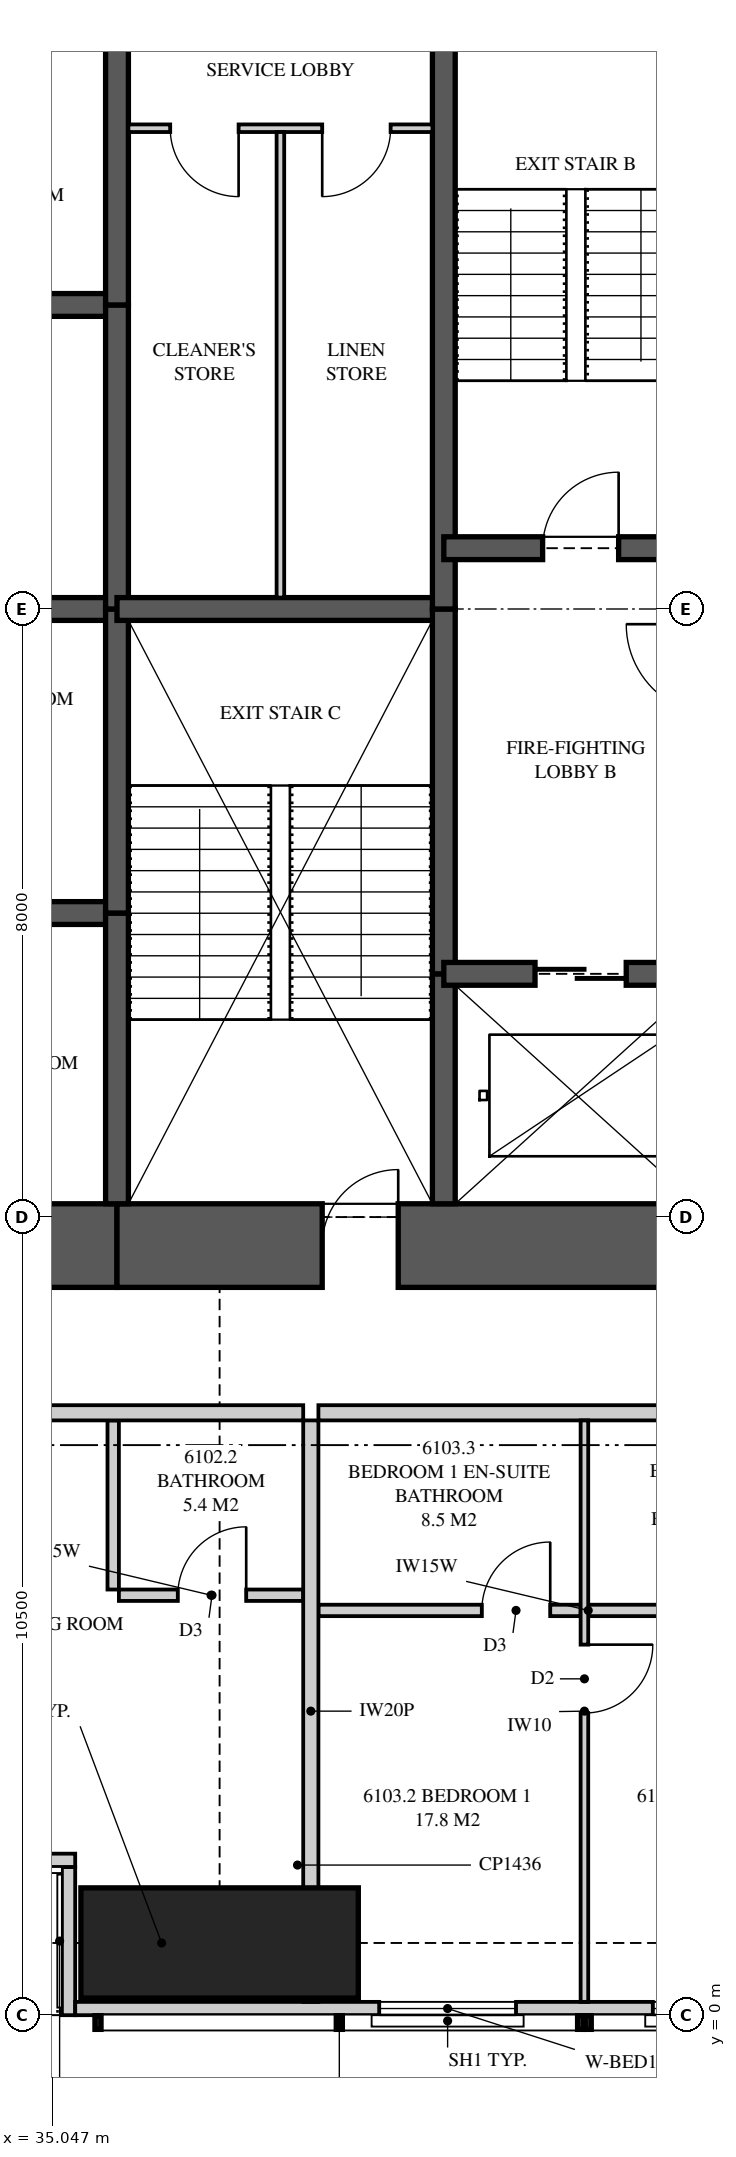
"""IFC4 building model, lengths in metres.
Left out: names, types, materials, properties, quantities, classifications, styles, units other than length and angle.
Written with IfcOpenShell. Run it as: python <this file> out.ifc"""

import sys

from ifc_helpers import new_model, si_unit, direction, frame, frame_2d, origin, origin_2d, place, context, subcontext, project, spatial, polyline, rectangle, outline, extrude, element, fill, save


model = new_model("IFC4")
c1 = context("Model", 3, precision=1e-05, world=origin(), true_north=direction((0.0, 1.0)))
c2 = subcontext(c1, "Body", "Model", "MODEL_VIEW")
j1 = project(units=[si_unit("LENGTHUNIT", "METRE"), si_unit("PLANEANGLEUNIT", "RADIAN")], contexts=[c1])
p1 = place(None, origin())
s1 = spatial("IfcSite", under=j1, at=p1, CompositionType="ELEMENT")
p2 = place(p1, origin())
s2 = spatial("IfcBuilding", under=s1, at=p2, CompositionType="ELEMENT")
p3 = place(p2, frame((0.0, 0.0, 224.95)))
s3 = spatial("IfcBuildingStorey", under=s2, at=p3, CompositionType="ELEMENT", Elevation=224.95)
p4 = place(p3, frame((37.25, 0.95, 0.0), z_axis=(0.0, 0.0, 1.0), x_axis=(0.0, 1.0, 0.0)))
e1 = element("IfcColumn", 1, at=p4, inside=s3, PredefinedType="COLUMN", context=c2, shape_type="SweptSolid", body=[
    extrude(rectangle(XDim=1.45, YDim=3.65, at=origin_2d()), origin(), (0.0, 0.0, 1.0), 3.5),
])
p5 = place(p3, frame((31.6, 10.125, 0.0), z_axis=(0.0, 0.0, 1.0), x_axis=(1.0, 0.0, 0.0)))
e2 = element("IfcWall", 2, at=p5, inside=s3, PredefinedType="SHEAR", context=c2, shape_type="SweptSolid", body=[
    extrude(rectangle(XDim=4.3, YDim=1.1, at=frame_2d((2.15, 0.0))), origin(), (0.0, 0.0, 1.0), 3.5),
])
p6 = place(p3, frame((35.9, 10.125, 0.0), z_axis=(0.0, 0.0, 1.0), x_axis=(1.0, 0.0, 0.0)))
e3 = element("IfcWall", 3, at=p6, inside=s3, PredefinedType="SHEAR", context=c2, shape_type="SweptSolid", body=[
    extrude(rectangle(XDim=8.175, YDim=1.1, at=frame_2d((4.087, 0.0))), origin(), (0.0, 0.0, 1.0), 3.5),
])
p7 = place(p6, frame((2.7, 0.0, 0.0)))
e4 = element("IfcOpeningElement", 4, at=p7, cuts=e3, PredefinedType="OPENING", context=c2, shape_type="SweptSolid", body=[
    extrude(rectangle(XDim=1.0, YDim=2.1, at=frame_2d((0.5, 1.05))), frame((0.0, 0.56, 0.0), z_axis=(0.0, -1.0, 0.0), x_axis=(1.0, 0.0, 0.0)), (0.0, 0.0, 1.0), 1.12),
])
p8 = place(p3, frame((35.9, 10.675, 0.0), z_axis=(0.0, 0.0, 1.0), x_axis=(0.0, 1.0, 0.0)))
e5 = element("IfcWall", 5, at=p8, inside=s3, PredefinedType="SHEAR", context=c2, shape_type="SweptSolid", body=[
    extrude(rectangle(XDim=3.825, YDim=0.3, at=frame_2d((1.913, 0.0))), origin(), (0.0, 0.0, 1.0), 3.5),
])
for number, where, z_axis, x_axis in (
    (6, (35.9, 14.5, 0.0), (0.0, 0.0, 1.0), (0.0, 1.0, 0.0)),
    (7, (35.9, 18.5, 0.0), (0.0, 0.0, 1.0), (0.0, 1.0, 0.0)),
):
    element("IfcWall", number, at=place(p3, frame(where, z_axis=z_axis, x_axis=x_axis)), inside=s3, PredefinedType="SHEAR", context=c2, shape_type="SweptSolid", body=[
        extrude(rectangle(XDim=4.0, YDim=0.3, at=frame_2d((2.0, 0.0))), origin(), (0.0, 0.0, 1.0), 3.5),
    ])
p9 = place(p3, frame((35.9, 22.5, 0.0), z_axis=(0.0, 0.0, 1.0), x_axis=(0.0, 1.0, 0.0)))
e8 = element("IfcWall", 8, at=p9, inside=s3, PredefinedType="SHEAR", context=c2, shape_type="SweptSolid", body=[
    extrude(rectangle(XDim=3.825, YDim=0.3, at=frame_2d((1.913, 0.0))), origin(), (0.0, 0.0, 1.0), 3.5),
])
p10 = place(p3, frame((40.2, 10.675, 0.0), z_axis=(0.0, 0.0, 1.0), x_axis=(0.0, 1.0, 0.0)))
e9 = element("IfcWall", 9, at=p10, inside=s3, PredefinedType="SHEAR", context=c2, shape_type="SweptSolid", body=[
    extrude(rectangle(XDim=3.025, YDim=0.3, at=frame_2d((1.512, 0.0))), origin(), (0.0, 0.0, 1.0), 3.5),
])
p11 = place(p3, frame((40.2, 13.7, 0.0), z_axis=(0.0, 0.0, 1.0), x_axis=(0.0, 1.0, 0.0)))
e10 = element("IfcWall", 10, at=p11, inside=s3, PredefinedType="SHEAR", context=c2, shape_type="SweptSolid", body=[
    extrude(rectangle(XDim=4.8, YDim=0.3, at=frame_2d((2.4, 0.0))), origin(), (0.0, 0.0, 1.0), 3.5),
])
p12 = place(p3, frame((40.2, 18.5, 0.0), z_axis=(0.0, 0.0, 1.0), x_axis=(0.0, 1.0, 0.0)))
e11 = element("IfcWall", 11, at=p12, inside=s3, PredefinedType="SHEAR", context=c2, shape_type="SweptSolid", body=[
    extrude(rectangle(XDim=7.825, YDim=0.3, at=frame_2d((3.913, 0.0))), origin(), (0.0, 0.0, 1.0), 3.5),
])
for number, where, z_axis, x_axis in (
    (12, (31.6, 14.5, 0.0), (0.0, 0.0, 1.0), (1.0, 0.0, 0.0)),
    (13, (31.6, 18.5, 0.0), (0.0, 0.0, 1.0), (1.0, 0.0, 0.0)),
    (14, (31.6, 22.5, 0.0), (0.0, 0.0, 1.0), (1.0, 0.0, 0.0)),
):
    element("IfcWall", number, at=place(p3, frame(where, z_axis=z_axis, x_axis=x_axis)), inside=s3, PredefinedType="SHEAR", context=c2, shape_type="SweptSolid", body=[
        extrude(rectangle(XDim=4.3, YDim=0.3, at=frame_2d((2.15, 0.0))), origin(), (0.0, 0.0, 1.0), 3.5),
    ])
p13 = place(p3, frame((35.9, 18.5, 0.0), z_axis=(0.0, 0.0, 1.0), x_axis=(1.0, 0.0, 0.0)))
e15 = element("IfcWall", 15, at=p13, inside=s3, PredefinedType="SHEAR", context=c2, shape_type="SweptSolid", body=[
    extrude(rectangle(XDim=4.3, YDim=0.3, at=frame_2d((2.15, 0.0))), origin(), (0.0, 0.0, 1.0), 3.5),
])
p14 = place(p3, frame((40.2, 13.7, 0.0), z_axis=(0.0, 0.0, 1.0), x_axis=(1.0, 0.0, 0.0)))
e16 = element("IfcWall", 16, at=p14, inside=s3, PredefinedType="SHEAR", context=c2, shape_type="SweptSolid", body=[
    extrude(rectangle(XDim=3.6, YDim=0.3, at=frame_2d((1.8, 0.0))), origin(), (0.0, 0.0, 1.0), 3.5),
])
p15 = place(p14, frame((1.2, 0.0, 0.0)))
e17 = element("IfcOpeningElement", 17, at=p15, cuts=e16, PredefinedType="OPENING", context=c2, shape_type="SweptSolid", body=[
    extrude(rectangle(XDim=1.2, YDim=2.1, at=frame_2d((0.6, 1.05))), frame((0.0, 0.16, 0.0), z_axis=(0.0, -1.0, 0.0), x_axis=(1.0, 0.0, 0.0)), (0.0, 0.0, 1.0), 0.32),
])
p16 = place(p3, frame((40.2, 19.3, 0.0), z_axis=(0.0, 0.0, 1.0), x_axis=(1.0, 0.0, 0.0)))
e18 = element("IfcWall", 18, at=p16, inside=s3, PredefinedType="SHEAR", context=c2, shape_type="SweptSolid", body=[
    extrude(rectangle(XDim=3.6, YDim=0.3, at=frame_2d((1.8, 0.0))), origin(), (0.0, 0.0, 1.0), 3.5),
])
p17 = place(p16, frame((1.3, 0.0, 0.0)))
e19 = element("IfcOpeningElement", 19, at=p17, cuts=e18, PredefinedType="OPENING", context=c2, shape_type="SweptSolid", body=[
    extrude(rectangle(XDim=1.0, YDim=2.1, at=frame_2d((0.5, 1.05))), frame((0.0, 0.16, 0.0), z_axis=(0.0, -1.0, 0.0), x_axis=(1.0, 0.0, 0.0)), (0.0, 0.0, 1.0), 0.32),
])
p18 = place(p3, frame((35.35, 0.087, 0.0), z_axis=(0.0, 0.0, 1.0), x_axis=(1.0, 0.0, 0.0)))
e20 = element("IfcWall", 20, at=p18, inside=s3, PredefinedType="SOLIDWALL", context=c2, shape_type="SweptSolid", body=[
    extrude(outline(polyline([(0.0, 0.0), (18.099, 0.0), (18.099, 3.26), (11.74, 3.26), (11.74, 2.3), (11.656, 2.3), (11.656, 3.26), (11.525, 3.26), (11.525, 2.3), (0.0, 2.3), (0.0, 0.0)])), frame((0.0, 0.087, 0.0), z_axis=(0.0, -1.0, 0.0), x_axis=(1.0, 0.0, 0.0)), (0.0, 0.0, 1.0), 0.175),
])
p19 = place(p18, frame((4.0, 0.0, 0.4)))
e21 = element("IfcOpeningElement", 21, at=p19, cuts=e20, PredefinedType="OPENING", context=c2, shape_type="SweptSolid", body=[
    extrude(rectangle(XDim=1.8, YDim=1.85, at=frame_2d((0.9, 0.925))), frame((0.0, 0.097, 0.0), z_axis=(0.0, -1.0, 0.0), x_axis=(1.0, 0.0, 0.0)), (0.0, 0.0, 1.0), 0.195),
])
p20 = place(p18, frame((7.6, 0.0, 0.4)))
e22 = element("IfcOpeningElement", 22, at=p20, cuts=e20, PredefinedType="OPENING", context=c2, shape_type="SweptSolid", body=[
    extrude(rectangle(XDim=1.8, YDim=1.85, at=frame_2d((0.9, 0.925))), frame((0.0, 0.097, 0.0), z_axis=(0.0, -1.0, 0.0), x_axis=(1.0, 0.0, 0.0)), (0.0, 0.0, 1.0), 0.195),
])
p21 = place(p18, frame((13.51, 0.0, 0.4)))
e23 = element("IfcOpeningElement", 23, at=p21, cuts=e20, PredefinedType="OPENING", context=c2, shape_type="SweptSolid", body=[
    extrude(rectangle(XDim=2.4, YDim=1.85, at=frame_2d((1.2, 0.925))), frame((0.0, 0.097, 0.0), z_axis=(0.0, -1.0, 0.0), x_axis=(1.0, 0.0, 0.0)), (0.0, 0.0, 1.0), 0.195),
])
p22 = place(p3, frame((32.3, 2.038, 0.0), z_axis=(0.0, 0.0, 1.0), x_axis=(1.0, 0.0, 0.0)))
e24 = element("IfcWall", 24, at=p22, inside=s3, PredefinedType="SOLIDWALL", context=c2, shape_type="SweptSolid", body=[
    extrude(rectangle(XDim=3.05, YDim=0.175, at=frame_2d((1.525, 0.0))), origin(), (0.0, 0.0, 1.0), 3.26),
])
p23 = place(p22, frame((0.625, 0.0, 0.0)))
e25 = element("IfcOpeningElement", 25, at=p23, cuts=e24, PredefinedType="OPENING", context=c2, shape_type="SweptSolid", body=[
    extrude(rectangle(XDim=1.8, YDim=2.25, at=frame_2d((0.9, 1.125))), frame((0.0, 0.097, 0.0), z_axis=(0.0, -1.0, 0.0), x_axis=(1.0, 0.0, 0.0)), (0.0, 0.0, 1.0), 0.195),
])
p24 = place(p3, frame((35.262, 0.0, 0.0), z_axis=(0.0, 0.0, 1.0), x_axis=(0.0, 1.0, 0.0)))
e26 = element("IfcWall", 26, at=p24, inside=s3, PredefinedType="SOLIDWALL", context=c2, shape_type="SweptSolid", body=[
    extrude(outline(polyline([(0.0, 0.0), (1.95, 0.0), (1.95, 3.26), (1.75, 3.26), (1.75, 2.3), (0.15, 2.3), (0.15, 3.26), (0.0, 3.26), (0.0, 0.0)])), frame((0.0, 0.087, 0.0), z_axis=(0.0, -1.0, 0.0), x_axis=(1.0, 0.0, 0.0)), (0.0, 0.0, 1.0), 0.175),
])
p25 = place(p3, frame((38.45, 0.175, 0.0), z_axis=(0.0, 0.0, 1.0), x_axis=(0.0, 1.0, 0.0)))
e27 = element("IfcWall", 27, at=p25, inside=s3, PredefinedType="PARTITIONING", context=c2, shape_type="SweptSolid", body=[
    extrude(outline(polyline([(0.529, 2.3), (0.0, 2.3), (0.0, 0.0), (0.529, 0.0), (0.529, 0.338), (1.021, 0.338), (1.021, 0.0), (7.65, 0.0), (7.65, 2.66), (1.685, 2.66), (1.685, 2.3), (1.021, 2.3), (1.021, 1.962), (0.529, 1.962), (0.529, 2.3)])), frame((0.0, 0.1, 0.0), z_axis=(0.0, -1.0, 0.0), x_axis=(1.0, 0.0, 0.0)), (0.0, 0.0, 1.0), 0.2),
])
p26 = place(p3, frame((26.5, 7.925, 0.0), z_axis=(0.0, 0.0, 1.0), x_axis=(1.0, 0.0, 0.0)))
e28 = element("IfcWall", 28, at=p26, inside=s3, PredefinedType="PARTITIONING", context=c2, shape_type="SweptSolid", body=[
    extrude(outline(polyline([(0.0, 0.0), (11.85, 0.0), (11.85, 3.26), (11.85, 2.66), (9.44, 2.66), (9.44, 3.26), (2.435, 3.26), (2.435, 2.66), (0.0, 2.66), (0.0, 3.26), (0.0, 0.0)])), frame((0.0, 0.1, 0.0), z_axis=(0.0, -1.0, 0.0), x_axis=(1.0, 0.0, 0.0)), (0.0, 0.0, 1.0), 0.2),
])
p27 = place(p26, frame((5.425, 0.0, 0.0)))
e29 = element("IfcOpeningElement", 29, at=p27, cuts=e28, PredefinedType="OPENING", context=c2, shape_type="SweptSolid", body=[
    extrude(rectangle(XDim=1.05, YDim=2.2, at=frame_2d((0.525, 1.1))), frame((0.0, 0.11, 0.0), z_axis=(0.0, -1.0, 0.0), x_axis=(1.0, 0.0, 0.0)), (0.0, 0.0, 1.0), 0.22),
])
p28 = place(p3, frame((35.925, 5.525, 0.0), z_axis=(0.0, 0.0, 1.0), x_axis=(1.0, 0.0, 0.0)))
e30 = element("IfcWall", 30, at=p28, inside=s3, PredefinedType="PLUMBINGWALL", context=c2, shape_type="SweptSolid", body=[
    extrude(outline(polyline([(0.0, 0.0), (2.425, 0.0), (2.425, 3.26), (2.425, 2.66), (0.04, 2.66), (0.04, 3.26), (0.0, 3.26), (0.0, 0.0)])), frame((0.0, 0.075, 0.0), z_axis=(0.0, -1.0, 0.0), x_axis=(1.0, 0.0, 0.0)), (0.0, 0.0, 1.0), 0.15),
])
p29 = place(p28, frame((0.775, 0.0, 0.0)))
e31 = element("IfcOpeningElement", 31, at=p29, cuts=e30, PredefinedType="OPENING", context=c2, shape_type="SweptSolid", body=[
    extrude(rectangle(XDim=0.9, YDim=2.1, at=frame_2d((0.45, 1.05))), frame((0.0, 0.085, 0.0), z_axis=(0.0, -1.0, 0.0), x_axis=(1.0, 0.0, 0.0)), (0.0, 0.0, 1.0), 0.17),
])
p30 = place(p3, frame((35.85, 5.6, 0.0), z_axis=(0.0, 0.0, 1.0), x_axis=(0.0, 1.0, 0.0)))
e32 = element("IfcWall", 32, at=p30, inside=s3, PredefinedType="PLUMBINGWALL", context=c2, shape_type="SweptSolid", body=[
    extrude(rectangle(XDim=2.225, YDim=0.15, at=frame_2d((1.112, 0.0))), origin(), (0.0, 0.0, 1.0), 3.26),
])
p31 = place(p3, frame((38.55, 7.925, 0.0), z_axis=(0.0, 0.0, 1.0), x_axis=(1.0, 0.0, 0.0)))
e33 = element("IfcWall", 33, at=p31, inside=s3, PredefinedType="PARTITIONING", context=c2, shape_type="SweptSolid", body=[
    extrude(outline(polyline([(0.0, 0.0), (7.325, 0.0), (7.325, 3.26), (7.325, 2.66), (7.015, 2.66), (7.015, 3.26), (0.01, 3.26), (0.01, 2.66), (0.0, 2.66), (0.0, 3.26), (0.0, 0.0)])), frame((0.0, 0.1, 0.0), z_axis=(0.0, -1.0, 0.0), x_axis=(1.0, 0.0, 0.0)), (0.0, 0.0, 1.0), 0.2),
])
p32 = place(p31, frame((6.125, 0.0, 0.0)))
e34 = element("IfcOpeningElement", 34, at=p32, cuts=e33, PredefinedType="OPENING", context=c2, shape_type="SweptSolid", body=[
    extrude(rectangle(XDim=1.05, YDim=2.2, at=frame_2d((0.525, 1.1))), frame((0.0, 0.11, 0.0), z_axis=(0.0, -1.0, 0.0), x_axis=(1.0, 0.0, 0.0)), (0.0, 0.0, 1.0), 0.22),
])
p33 = place(p3, frame((42.05, 0.175, 0.0), z_axis=(0.0, 0.0, 1.0), x_axis=(0.0, 1.0, 0.0)))
e35 = element("IfcWall", 35, at=p33, inside=s3, PredefinedType="PARTITIONING", context=c2, shape_type="SweptSolid", body=[
    extrude(outline(polyline([(0.0, 0.0), (7.65, 0.0), (7.65, 3.26), (1.635, 3.26), (1.635, 2.3), (0.0, 2.3), (0.0, 3.26), (0.0, 0.0)])), frame((0.0, 0.05, 0.0), z_axis=(0.0, -1.0, 0.0), x_axis=(1.0, 0.0, 0.0)), (0.0, 0.0, 1.0), 0.1),
])
p34 = place(p33, frame((3.8, 0.0, 0.0)))
e36 = element("IfcOpeningElement", 36, at=p34, cuts=e35, PredefinedType="OPENING", context=c2, shape_type="SweptSolid", body=[
    extrude(rectangle(XDim=0.9, YDim=2.1, at=frame_2d((0.45, 1.05))), frame((0.0, 0.06, 0.0), z_axis=(0.0, -1.0, 0.0), x_axis=(1.0, 0.0, 0.0)), (0.0, 0.0, 1.0), 0.12),
])
p35 = place(p3, frame((38.55, 5.325, 0.0), z_axis=(0.0, 0.0, 1.0), x_axis=(1.0, 0.0, 0.0)))
e37 = element("IfcWall", 37, at=p35, inside=s3, PredefinedType="PLUMBINGWALL", context=c2, shape_type="SweptSolid", body=[
    extrude(rectangle(XDim=3.45, YDim=0.15, at=frame_2d((1.725, 0.0))), origin(), (0.0, 0.0, 1.0), 3.26),
])
p36 = place(p35, frame((2.15, 0.0, 0.0)))
e38 = element("IfcOpeningElement", 38, at=p36, cuts=e37, PredefinedType="OPENING", context=c2, shape_type="SweptSolid", body=[
    extrude(rectangle(XDim=0.9, YDim=2.1, at=frame_2d((0.45, 1.05))), frame((0.0, 0.085, 0.0), z_axis=(0.0, -1.0, 0.0), x_axis=(1.0, 0.0, 0.0)), (0.0, 0.0, 1.0), 0.17),
])
p37 = place(p3, frame((42.1, 5.325, 0.0), z_axis=(0.0, 0.0, 1.0), x_axis=(1.0, 0.0, 0.0)))
e39 = element("IfcWall", 39, at=p37, inside=s3, PredefinedType="PLUMBINGWALL", context=c2, shape_type="SweptSolid", body=[
    extrude(outline(polyline([(0.0, 0.0), (3.5, 0.0), (3.5, 3.26), (3.5, 2.66), (3.49, 2.66), (3.49, 3.26), (0.0, 3.26), (0.0, 0.0)])), frame((0.0, 0.075, 0.0), z_axis=(0.0, -1.0, 0.0), x_axis=(1.0, 0.0, 0.0)), (0.0, 0.0, 1.0), 0.15),
])
p38 = place(p37, frame((2.2, 0.0, 0.0)))
e40 = element("IfcOpeningElement", 40, at=p38, cuts=e39, PredefinedType="OPENING", context=c2, shape_type="SweptSolid", body=[
    extrude(rectangle(XDim=0.9, YDim=2.1, at=frame_2d((0.45, 1.05))), frame((0.0, 0.085, 0.0), z_axis=(0.0, -1.0, 0.0), x_axis=(1.0, 0.0, 0.0)), (0.0, 0.0, 1.0), 0.17),
])
p39 = place(p3, frame((36.05, 24.825, 0.0), z_axis=(0.0, 0.0, 1.0), x_axis=(1.0, 0.0, 0.0)))
e41 = element("IfcWall", 41, at=p39, inside=s3, PredefinedType="PARTITIONING", context=c2, shape_type="SweptSolid", body=[
    extrude(rectangle(XDim=4.0, YDim=0.1, at=frame_2d((2.0, 0.0))), origin(), (0.0, 0.0, 1.0), 3.26),
])
p40 = place(p39, frame((0.55, 0.0, 0.0)))
e42 = element("IfcOpeningElement", 42, at=p40, cuts=e41, PredefinedType="OPENING", context=c2, shape_type="SweptSolid", body=[
    extrude(rectangle(XDim=0.9, YDim=2.1, at=frame_2d((0.45, 1.05))), frame((0.0, 0.06, 0.0), z_axis=(0.0, -1.0, 0.0), x_axis=(1.0, 0.0, 0.0)), (0.0, 0.0, 1.0), 0.12),
])
p41 = place(p39, frame((2.55, 0.0, 0.0)))
e43 = element("IfcOpeningElement", 43, at=p41, cuts=e41, PredefinedType="OPENING", context=c2, shape_type="SweptSolid", body=[
    extrude(rectangle(XDim=0.9, YDim=2.1, at=frame_2d((0.45, 1.05))), frame((0.0, 0.06, 0.0), z_axis=(0.0, -1.0, 0.0), x_axis=(1.0, 0.0, 0.0)), (0.0, 0.0, 1.0), 0.12),
])
p42 = place(p3, frame((38.05, 18.65, 0.0), z_axis=(0.0, 0.0, 1.0), x_axis=(0.0, 1.0, 0.0)))
e44 = element("IfcWall", 44, at=p42, inside=s3, PredefinedType="PARTITIONING", context=c2, shape_type="SweptSolid", body=[
    extrude(rectangle(XDim=6.125, YDim=0.1, at=frame_2d((3.062, 0.0))), origin(), (0.0, 0.0, 1.0), 3.26),
])
p43 = place(p19, origin())
e45 = element("IfcWindow", 45, at=p43, inside=s3, PartitioningType="SINGLE_PANEL", PredefinedType="WINDOW", context=c2, shape_type="SweptSolid", body=[
    extrude(rectangle(XDim=1.8, YDim=1.85, at=frame_2d((0.9, 0.925))), frame((0.0, 0.03, 0.0), z_axis=(0.0, -1.0, 0.0), x_axis=(1.0, 0.0, 0.0)), (0.0, 0.0, 1.0), 0.06),
])
fill(e21, e45)
p44 = place(p20, origin())
e46 = element("IfcWindow", 46, at=p44, inside=s3, PartitioningType="SINGLE_PANEL", PredefinedType="WINDOW", context=c2, shape_type="SweptSolid", body=[
    extrude(rectangle(XDim=1.8, YDim=1.85, at=frame_2d((0.9, 0.925))), frame((0.0, 0.03, 0.0), z_axis=(0.0, -1.0, 0.0), x_axis=(1.0, 0.0, 0.0)), (0.0, 0.0, 1.0), 0.06),
])
fill(e22, e46)
p45 = place(p29, origin())
e47 = element("IfcDoor", 47, at=p45, inside=s3, OperationType="SINGLE_SWING_RIGHT", PredefinedType="DOOR", context=c2, shape_type="SweptSolid", body=[
    extrude(rectangle(XDim=0.9, YDim=2.1, at=frame_2d((0.45, 1.05))), frame((0.0, 0.025, 0.0), z_axis=(0.0, -1.0, 0.0), x_axis=(1.0, 0.0, 0.0)), (0.0, 0.0, 1.0), 0.05),
])
fill(e31, e47)
p46 = place(p34, frame((0.9, 0.0, 0.0), z_axis=(0.0, 0.0, 1.0), x_axis=(-1.0, 0.0, 0.0)))
e48 = element("IfcDoor", 48, at=p46, inside=s3, OperationType="SINGLE_SWING_LEFT", PredefinedType="DOOR", context=c2, shape_type="SweptSolid", body=[
    extrude(rectangle(XDim=0.9, YDim=2.1, at=frame_2d((0.45, 1.05))), frame((0.0, 0.025, 0.0), z_axis=(0.0, -1.0, 0.0), x_axis=(1.0, 0.0, 0.0)), (0.0, 0.0, 1.0), 0.05),
])
fill(e36, e48)
p47 = place(p36, origin())
e49 = element("IfcDoor", 49, at=p47, inside=s3, OperationType="SINGLE_SWING_RIGHT", PredefinedType="DOOR", context=c2, shape_type="SweptSolid", body=[
    extrude(rectangle(XDim=0.9, YDim=2.1, at=frame_2d((0.45, 1.05))), frame((0.0, 0.025, 0.0), z_axis=(0.0, -1.0, 0.0), x_axis=(1.0, 0.0, 0.0)), (0.0, 0.0, 1.0), 0.05),
])
fill(e38, e49)
p48 = place(p40, frame((0.9, 0.0, 0.0), z_axis=(0.0, 0.0, 1.0), x_axis=(-1.0, 0.0, 0.0)))
e50 = element("IfcDoor", 50, at=p48, inside=s3, OperationType="SINGLE_SWING_LEFT", PredefinedType="DOOR", context=c2, shape_type="SweptSolid", body=[
    extrude(rectangle(XDim=0.9, YDim=2.1, at=frame_2d((0.45, 1.05))), frame((0.0, 0.025, 0.0), z_axis=(0.0, -1.0, 0.0), x_axis=(1.0, 0.0, 0.0)), (0.0, 0.0, 1.0), 0.05),
])
fill(e42, e50)
p49 = place(p41, frame((0.9, 0.0, 0.0), z_axis=(0.0, 0.0, 1.0), x_axis=(-1.0, 0.0, 0.0)))
e51 = element("IfcDoor", 51, at=p49, inside=s3, OperationType="SINGLE_SWING_RIGHT", PredefinedType="DOOR", context=c2, shape_type="SweptSolid", body=[
    extrude(rectangle(XDim=0.9, YDim=2.1, at=frame_2d((0.45, 1.05))), frame((0.0, 0.025, 0.0), z_axis=(0.0, -1.0, 0.0), x_axis=(1.0, 0.0, 0.0)), (0.0, 0.0, 1.0), 0.05),
])
fill(e43, e51)
p50 = place(p17, origin())
e52 = element("IfcDoor", 52, at=p50, inside=s3, OperationType="SINGLE_SWING_RIGHT", PredefinedType="DOOR", context=c2, shape_type="SweptSolid", body=[
    extrude(rectangle(XDim=1.0, YDim=2.1, at=frame_2d((0.5, 1.05))), frame((0.0, 0.025, 0.0), z_axis=(0.0, -1.0, 0.0), x_axis=(1.0, 0.0, 0.0)), (0.0, 0.0, 1.0), 0.05),
])
fill(e19, e52)
p51 = place(p15, origin())
e53 = element("IfcDoor", 53, at=p51, inside=s3, OperationType="SLIDING_TO_LEFT", PredefinedType="DOOR", context=c2, shape_type="SweptSolid", body=[
    extrude(rectangle(XDim=1.2, YDim=2.1, at=frame_2d((0.6, 1.05))), frame((0.0, 0.025, 0.0), z_axis=(0.0, -1.0, 0.0), x_axis=(1.0, 0.0, 0.0)), (0.0, 0.0, 1.0), 0.05),
])
fill(e17, e53)
p52 = place(p7, origin())
e54 = element("IfcDoor", 54, at=p52, inside=s3, OperationType="SINGLE_SWING_RIGHT", PredefinedType="DOOR", context=c2, shape_type="SweptSolid", body=[
    extrude(rectangle(XDim=1.0, YDim=2.1, at=frame_2d((0.5, 1.05))), frame((0.0, 0.025, 0.0), z_axis=(0.0, -1.0, 0.0), x_axis=(1.0, 0.0, 0.0)), (0.0, 0.0, 1.0), 0.05),
])
fill(e4, e54)
save(model, sys.argv[1])
